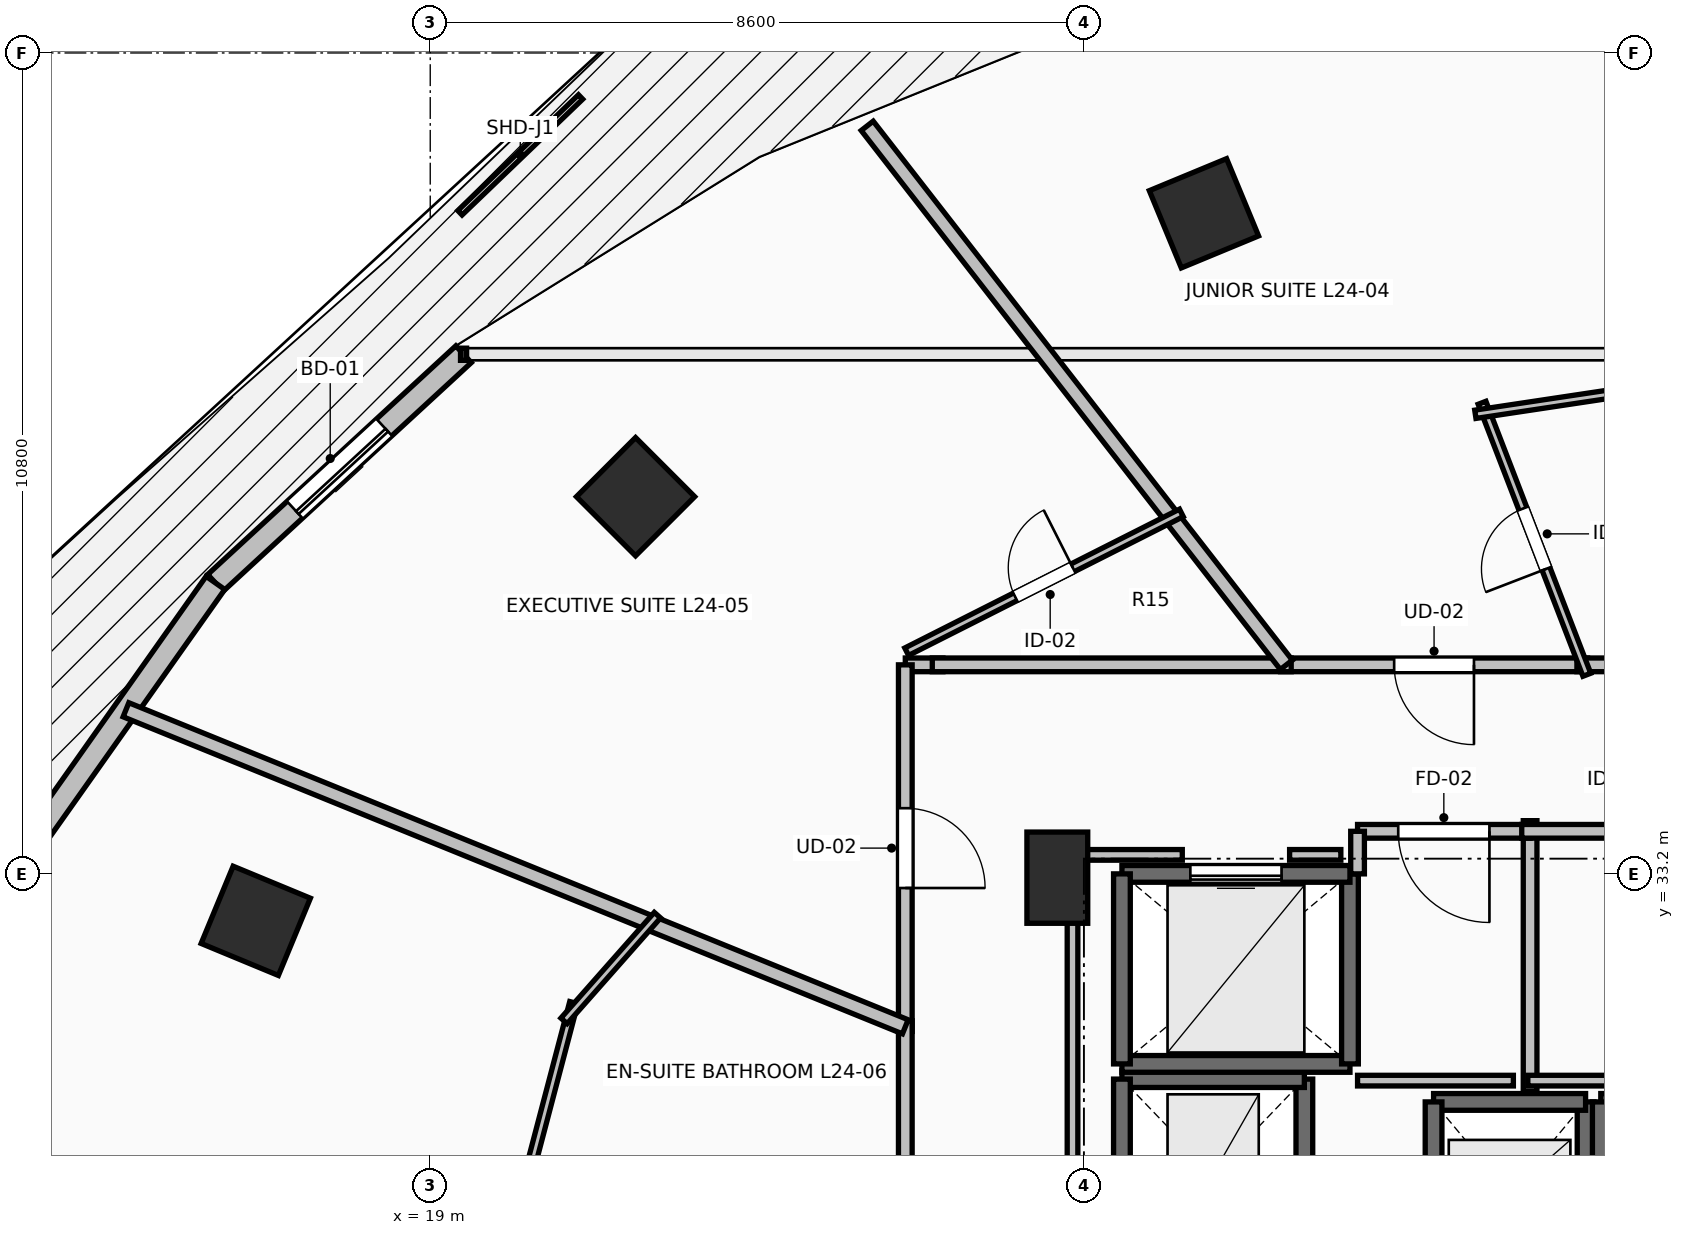
"""IFC4 building model, lengths in metres.
Left out: names, types, materials, properties, quantities, classifications, styles, units other than length and angle.
Written with IfcOpenShell. Run it as: python <this file> out.ifc"""

import sys

from ifc_helpers import new_model, si_unit, direction, frame, frame_2d, origin, origin_2d, place, context, subcontext, project, spatial, rectangle, extrude, element, fill, save


model = new_model("IFC4")
c1 = context("Model", 3, precision=1e-05, world=origin(), true_north=direction((0.0, 1.0)))
c2 = subcontext(c1, "Body", "Model", "MODEL_VIEW")
j1 = project(units=[si_unit("LENGTHUNIT", "METRE"), si_unit("PLANEANGLEUNIT", "RADIAN")], contexts=[c1])
p1 = place(None, origin())
s1 = spatial("IfcSite", under=j1, at=p1, CompositionType="ELEMENT")
p2 = place(p1, origin())
s2 = spatial("IfcBuilding", under=s1, at=p2, CompositionType="ELEMENT")
p3 = place(p2, frame((0.0, 0.0, 92.8)))
s3 = spatial("IfcBuildingStorey", under=s2, at=p3, CompositionType="ELEMENT", Elevation=92.8)
for number, where, z_axis, x_axis in (
    (1, (29.179, 41.891, 0.0), (0.0, 0.0, 1.0), (-0.383, 0.924, 0.0)),
    (2, (21.701, 38.162, 0.0), (0.0, 0.0, 1.0), (-0.707, 0.707, 0.0)),
    (3, (16.705, 32.582, 0.0), (0.0, 0.0, 1.0), (-0.924, 0.383, 0.0)),
):
    element("IfcColumn", number, at=place(p3, frame(where, z_axis=z_axis, x_axis=x_axis)), inside=s3, PredefinedType="COLUMN", context=c2, shape_type="SweptSolid", body=[
        extrude(rectangle(XDim=1.1, YDim=1.1, at=origin_2d()), origin(), (0.0, 0.0, 1.0), 3.5),
    ])
p4 = place(p3, frame((27.25, 33.15, 0.0), z_axis=(0.0, 0.0, 1.0), x_axis=(1.0, 0.0, 0.0)))
e4 = element("IfcColumn", 4, at=p4, inside=s3, PredefinedType="PILASTER", context=c2, shape_type="SweptSolid", body=[
    extrude(rectangle(XDim=0.8, YDim=1.2, at=origin_2d()), origin(), (0.0, 0.0, 1.0), 3.5),
])
p5 = place(p3, frame((19.438, 40.036, 0.0), z_axis=(0.0, 0.0, 1.0), x_axis=(-0.735416718093, -0.677615119924, 0.0)))
e5 = element("IfcWall", 5, at=p5, inside=s3, PredefinedType="STANDARD", context=c2, shape_type="SweptSolid", body=[
    extrude(rectangle(XDim=4.439, YDim=0.3, at=frame_2d((2.22, 0.0))), origin(), (0.0, 0.0, 1.0), 3.24),
])
p6 = place(p5, frame((1.419, 0.0, 0.0)))
e6 = element("IfcOpeningElement", 6, at=p6, cuts=e5, PredefinedType="OPENING", context=c2, shape_type="SweptSolid", body=[
    extrude(rectangle(XDim=1.6, YDim=2.3, at=frame_2d((0.8, 1.15))), frame((0.0, 0.165, 0.0), z_axis=(0.0, -1.0, 0.0), x_axis=(1.0, 0.0, 0.0)), (0.0, 0.0, 1.0), 0.33),
])
p7 = place(p3, frame((16.174, 37.028, 0.0), z_axis=(0.0, 0.0, 1.0), x_axis=(-0.57716435238, -0.81662801222, 0.0)))
e7 = element("IfcWall", 7, at=p7, inside=s3, PredefinedType="STANDARD", context=c2, shape_type="SweptSolid", body=[
    extrude(rectangle(XDim=4.202, YDim=0.3, at=frame_2d((2.101, 0.0))), origin(), (0.0, 0.0, 1.0), 3.24),
])
p8 = place(p3, frame((34.2, 27.8, 0.0), z_axis=(0.0, 0.0, 1.0), x_axis=(0.0, 1.0, 0.0)))
e8 = element("IfcWall", 8, at=p8, inside=s3, PredefinedType="SOLIDWALL", context=c2, shape_type="SweptSolid", body=[
    extrude(rectangle(XDim=2.4, YDim=0.22, at=frame_2d((1.2, 0.0))), origin(), (0.0, 0.0, 1.0), 3.24),
])
p9 = place(p3, frame((34.2, 30.2, 0.0), z_axis=(0.0, 0.0, 1.0), x_axis=(-1.0, 0.0, 0.0)))
e9 = element("IfcWall", 9, at=p9, inside=s3, PredefinedType="SOLIDWALL", context=c2, shape_type="SweptSolid", body=[
    extrude(rectangle(XDim=2.0, YDim=0.22, at=frame_2d((1.0, 0.0))), origin(), (0.0, 0.0, 1.0), 3.24),
])
p10 = place(p3, frame((32.2, 30.2, 0.0), z_axis=(0.0, 0.0, 1.0), x_axis=(0.0, -1.0, 0.0)))
e10 = element("IfcWall", 10, at=p10, inside=s3, PredefinedType="SOLIDWALL", context=c2, shape_type="SweptSolid", body=[
    extrude(rectangle(XDim=2.4, YDim=0.22, at=frame_2d((1.2, 0.0))), origin(), (0.0, 0.0, 1.0), 3.24),
])
p11 = place(p3, frame((36.4, 30.2, 0.0), z_axis=(0.0, 0.0, 1.0), x_axis=(-1.0, 0.0, 0.0)))
e11 = element("IfcWall", 11, at=p11, inside=s3, PredefinedType="SOLIDWALL", context=c2, shape_type="SweptSolid", body=[
    extrude(rectangle(XDim=2.0, YDim=0.22, at=frame_2d((1.0, 0.0))), origin(), (0.0, 0.0, 1.0), 3.24),
])
p12 = place(p3, frame((34.4, 30.2, 0.0), z_axis=(0.0, 0.0, 1.0), x_axis=(0.0, -1.0, 0.0)))
e12 = element("IfcWall", 12, at=p12, inside=s3, PredefinedType="SOLIDWALL", context=c2, shape_type="SweptSolid", body=[
    extrude(rectangle(XDim=2.4, YDim=0.22, at=frame_2d((1.2, 0.0))), origin(), (0.0, 0.0, 1.0), 3.24),
])
p13 = place(p3, frame((30.5, 28.0, 0.0), z_axis=(0.0, 0.0, 1.0), x_axis=(0.0, 1.0, 0.0)))
e13 = element("IfcWall", 13, at=p13, inside=s3, PredefinedType="SHEAR", context=c2, shape_type="SweptSolid", body=[
    extrude(rectangle(XDim=2.5, YDim=0.22, at=frame_2d((1.25, 0.0))), origin(), (0.0, 0.0, 1.0), 3.24),
])
p14 = place(p3, frame((30.5, 30.5, 0.0), z_axis=(0.0, 0.0, 1.0), x_axis=(-1.0, 0.0, 0.0)))
e14 = element("IfcWall", 14, at=p14, inside=s3, PredefinedType="SHEAR", context=c2, shape_type="SweptSolid", body=[
    extrude(rectangle(XDim=2.4, YDim=0.22, at=frame_2d((1.2, 0.0))), origin(), (0.0, 0.0, 1.0), 3.24),
])
p15 = place(p3, frame((28.1, 30.5, 0.0), z_axis=(0.0, 0.0, 1.0), x_axis=(0.0, -1.0, 0.0)))
e15 = element("IfcWall", 15, at=p15, inside=s3, PredefinedType="SHEAR", context=c2, shape_type="SweptSolid", body=[
    extrude(rectangle(XDim=2.5, YDim=0.22, at=frame_2d((1.25, 0.0))), origin(), (0.0, 0.0, 1.0), 3.24),
])
p16 = place(p3, frame((28.1, 30.7, 0.0), z_axis=(0.0, 0.0, 1.0), x_axis=(1.0, 0.0, 0.0)))
e16 = element("IfcWall", 16, at=p16, inside=s3, PredefinedType="SOLIDWALL", context=c2, shape_type="SweptSolid", body=[
    extrude(rectangle(XDim=3.0, YDim=0.22, at=frame_2d((1.5, 0.0))), origin(), (0.0, 0.0, 1.0), 3.24),
])
p17 = place(p3, frame((31.1, 30.7, 0.0), z_axis=(0.0, 0.0, 1.0), x_axis=(0.0, 1.0, 0.0)))
e17 = element("IfcWall", 17, at=p17, inside=s3, PredefinedType="SOLIDWALL", context=c2, shape_type="SweptSolid", body=[
    extrude(rectangle(XDim=2.5, YDim=0.22, at=frame_2d((1.25, 0.0))), origin(), (0.0, 0.0, 1.0), 3.24),
])
p18 = place(p3, frame((31.1, 33.2, 0.0), z_axis=(0.0, 0.0, 1.0), x_axis=(-1.0, 0.0, 0.0)))
e18 = element("IfcWall", 18, at=p18, inside=s3, PredefinedType="SOLIDWALL", context=c2, shape_type="SweptSolid", body=[
    extrude(rectangle(XDim=3.0, YDim=0.22, at=frame_2d((1.5, 0.0))), origin(), (0.0, 0.0, 1.0), 3.24),
])
p19 = place(p18, frame((0.9, 0.0, 0.0)))
e19 = element("IfcOpeningElement", 19, at=p19, cuts=e18, PredefinedType="OPENING", context=c2, shape_type="SweptSolid", body=[
    extrude(rectangle(XDim=1.2, YDim=2.2, at=frame_2d((0.6, 1.1))), frame((0.0, 0.125, 0.0), z_axis=(0.0, -1.0, 0.0), x_axis=(1.0, 0.0, 0.0)), (0.0, 0.0, 1.0), 0.25),
])
p20 = place(p3, frame((28.1, 33.2, 0.0), z_axis=(0.0, 0.0, 1.0), x_axis=(0.0, -1.0, 0.0)))
e20 = element("IfcWall", 20, at=p20, inside=s3, PredefinedType="SOLIDWALL", context=c2, shape_type="SweptSolid", body=[
    extrude(rectangle(XDim=2.5, YDim=0.22, at=frame_2d((1.25, 0.0))), origin(), (0.0, 0.0, 1.0), 3.24),
])
p21 = place(p3, frame((33.47, 30.34, 0.0), z_axis=(0.0, 0.0, 1.0), x_axis=(0.0, 1.0, 0.0)))
e21 = element("IfcWall", 21, at=p21, inside=s3, PredefinedType="PARTITIONING", context=c2, shape_type="SweptSolid", body=[
    extrude(rectangle(XDim=3.56, YDim=0.18, at=frame_2d((1.78, 0.0))), origin(), (0.0, 0.0, 1.0), 3.24),
])
p22 = place(p3, frame((33.47, 33.76, 0.0), z_axis=(0.0, 0.0, 1.0), x_axis=(-1.0, 0.0, 0.0)))
e22 = element("IfcWall", 22, at=p22, inside=s3, PredefinedType="PARTITIONING", context=c2, shape_type="SweptSolid", body=[
    extrude(rectangle(XDim=2.27, YDim=0.18, at=frame_2d((1.135, 0.0))), origin(), (0.0, 0.0, 1.0), 3.24),
])
p23 = place(p22, frame((0.535, 0.0, 0.0)))
e23 = element("IfcOpeningElement", 23, at=p23, cuts=e22, PredefinedType="OPENING", context=c2, shape_type="SweptSolid", body=[
    extrude(rectangle(XDim=1.2, YDim=2.15, at=frame_2d((0.6, 1.075))), frame((0.0, 0.105, 0.0), z_axis=(0.0, -1.0, 0.0), x_axis=(1.0, 0.0, 0.0)), (0.0, 0.0, 1.0), 0.21),
])
p24 = place(p3, frame((31.2, 33.76, 0.0), z_axis=(0.0, 0.0, 1.0), x_axis=(0.0, -1.0, 0.0)))
e24 = element("IfcWall", 24, at=p24, inside=s3, PredefinedType="PARTITIONING", context=c2, shape_type="SweptSolid", body=[
    extrude(rectangle(XDim=0.56, YDim=0.18, at=frame_2d((0.28, 0.0))), origin(), (0.0, 0.0, 1.0), 3.24),
])
p25 = place(p3, frame((37.49, 33.76, 0.0), z_axis=(0.0, 0.0, 1.0), x_axis=(-1.0, 0.0, 0.0)))
e25 = element("IfcWall", 25, at=p25, inside=s3, PredefinedType="PARTITIONING", context=c2, shape_type="SweptSolid", body=[
    extrude(rectangle(XDim=4.13, YDim=0.18, at=frame_2d((2.065, 0.0))), origin(), (0.0, 0.0, 1.0), 3.24),
])
p26 = place(p25, frame((1.64, 0.0, 0.0)))
e26 = element("IfcOpeningElement", 26, at=p26, cuts=e25, PredefinedType="OPENING", context=c2, shape_type="SweptSolid", body=[
    extrude(rectangle(XDim=0.85, YDim=2.1, at=frame_2d((0.425, 1.05))), frame((0.0, 0.105, 0.0), z_axis=(0.0, -1.0, 0.0), x_axis=(1.0, 0.0, 0.0)), (0.0, 0.0, 1.0), 0.21),
])
p27 = place(p3, frame((34.226, 35.95, 0.0), z_axis=(0.0, 0.0, 1.0), x_axis=(-1.0, 0.0, 0.0)))
e27 = element("IfcWall", 27, at=p27, inside=s3, PredefinedType="PARTITIONING", context=c2, shape_type="SweptSolid", body=[
    extrude(rectangle(XDim=4.039, YDim=0.18, at=frame_2d((2.02, 0.0))), origin(), (0.0, 0.0, 1.0), 2.432),
])
p28 = place(p27, frame((1.494, 0.0, 0.0)))
e28 = element("IfcOpeningElement", 28, at=p28, cuts=e27, PredefinedType="OPENING", context=c2, shape_type="SweptSolid", body=[
    extrude(rectangle(XDim=1.05, YDim=2.2, at=frame_2d((0.525, 1.1))), frame((0.0, 0.105, 0.0), z_axis=(0.0, -1.0, 0.0), x_axis=(1.0, 0.0, 0.0)), (0.0, 0.0, 1.0), 0.21),
])
p29 = place(p3, frame((36.703, 35.95, 0.0), z_axis=(0.0, 0.0, 1.0), x_axis=(-1.0, 0.0, 0.0)))
e29 = element("IfcWall", 29, at=p29, inside=s3, PredefinedType="PARTITIONING", context=c2, shape_type="SweptSolid", body=[
    extrude(rectangle(XDim=2.617, YDim=0.18, at=frame_2d((1.309, 0.0))), origin(), (0.0, 0.0, 1.0), 2.972),
])
p30 = place(p3, frame((25.745, 35.95, 0.0), z_axis=(0.0, 0.0, 1.0), x_axis=(-1.0, 0.0, 0.0)))
e30 = element("IfcWall", 30, at=p30, inside=s3, PredefinedType="PARTITIONING", context=c2, shape_type="SweptSolid", body=[
    extrude(rectangle(XDim=0.495, YDim=0.18, at=frame_2d((0.248, 0.0))), origin(), (0.0, 0.0, 1.0), 3.24),
])
p31 = place(p3, frame((25.25, 35.95, 0.0), z_axis=(0.0, 0.0, 1.0), x_axis=(0.0, -1.0, 0.0)))
e31 = element("IfcWall", 31, at=p31, inside=s3, PredefinedType="PARTITIONING", context=c2, shape_type="SweptSolid", body=[
    extrude(rectangle(XDim=4.822, YDim=0.18, at=frame_2d((2.411, 0.0))), origin(), (0.0, 0.0, 1.0), 2.432),
])
p32 = place(p31, frame((1.886, 0.0, 0.0)))
e32 = element("IfcOpeningElement", 32, at=p32, cuts=e31, PredefinedType="OPENING", context=c2, shape_type="SweptSolid", body=[
    extrude(rectangle(XDim=1.05, YDim=2.2, at=frame_2d((0.525, 1.1))), frame((0.0, 0.105, 0.0), z_axis=(0.0, -1.0, 0.0), x_axis=(1.0, 0.0, 0.0)), (0.0, 0.0, 1.0), 0.21),
])
p33 = place(p3, frame((30.327, 35.95, 0.0), z_axis=(0.0, 0.0, 1.0), x_axis=(-1.0, 0.0, 0.0)))
e33 = element("IfcWall", 33, at=p33, inside=s3, PredefinedType="PARTITIONING", context=c2, shape_type="SweptSolid", body=[
    extrude(rectangle(XDim=4.722, YDim=0.18, at=frame_2d((2.361, 0.0))), origin(), (0.0, 0.0, 1.0), 2.432),
])
p34 = place(p3, frame((25.25, 31.268, 0.0), z_axis=(0.0, 0.0, 1.0), x_axis=(0.0, -1.0, 0.0)))
e34 = element("IfcWall", 34, at=p34, inside=s3, PredefinedType="PARTITIONING", context=c2, shape_type="SweptSolid", body=[
    extrude(rectangle(XDim=3.343, YDim=0.18, at=frame_2d((1.671, 0.0))), origin(), (0.0, 0.0, 1.0), 2.432),
])
p35 = place(p3, frame((34.216, 35.819, 0.0), z_axis=(0.0, 0.0, 1.0), x_axis=(-0.359516562862, 0.933138704067, 0.0)))
e35 = element("IfcWall", 35, at=p35, inside=s3, PredefinedType="PARTITIONING", context=c2, shape_type="SweptSolid", body=[
    extrude(rectangle(XDim=3.835, YDim=0.11, at=frame_2d((1.917, 0.0))), origin(), (0.0, 0.0, 1.0), 2.432),
])
p36 = place(p35, frame((1.492, 0.0, 0.0)))
e36 = element("IfcOpeningElement", 36, at=p36, cuts=e35, PredefinedType="OPENING", context=c2, shape_type="SweptSolid", body=[
    extrude(rectangle(XDim=0.85, YDim=2.1, at=frame_2d((0.425, 1.05))), frame((0.0, 0.07, 0.0), z_axis=(0.0, -1.0, 0.0), x_axis=(1.0, 0.0, 0.0)), (0.0, 0.0, 1.0), 0.14),
])
p37 = place(p3, frame((32.75, 39.246, 0.0), z_axis=(0.0, 0.0, 1.0), x_axis=(0.988874324222, 0.148753389525, 0.0)))
e37 = element("IfcWall", 37, at=p37, inside=s3, PredefinedType="PARTITIONING", context=c2, shape_type="SweptSolid", body=[
    extrude(rectangle(XDim=3.527, YDim=0.11, at=frame_2d((1.764, 0.0))), origin(), (0.0, 0.0, 1.0), 2.432),
])
p38 = place(p3, frame((24.749, 43.041, 0.0), z_axis=(0.0, 0.0, 1.0), x_axis=(0.61384652665, -0.789425387051, 0.0)))
e38 = element("IfcWall", 38, at=p38, inside=s3, PredefinedType="PARTITIONING", context=c2, shape_type="SweptSolid", body=[
    extrude(rectangle(XDim=8.983, YDim=0.2, at=frame_2d((4.491, 0.0))), origin(), (0.0, 0.0, 1.0), 2.432),
])
p39 = place(p3, frame((25.268, 36.123, 0.0), z_axis=(0.0, 0.0, 1.0), x_axis=(0.892501687321, 0.451044053425, 0.0)))
e39 = element("IfcWall", 39, at=p39, inside=s3, PredefinedType="PARTITIONING", context=c2, shape_type="SweptSolid", body=[
    extrude(rectangle(XDim=4.049, YDim=0.11, at=frame_2d((2.025, 0.0))), origin(), (0.0, 0.0, 1.0), 2.432),
])
p40 = place(p39, frame((1.6, 0.0, 0.0)))
e40 = element("IfcOpeningElement", 40, at=p40, cuts=e39, PredefinedType="OPENING", context=c2, shape_type="SweptSolid", body=[
    extrude(rectangle(XDim=0.85, YDim=2.1, at=frame_2d((0.425, 1.05))), frame((0.0, 0.07, 0.0), z_axis=(0.0, -1.0, 0.0), x_axis=(1.0, 0.0, 0.0)), (0.0, 0.0, 1.0), 0.14),
])
p41 = place(p3, frame((14.997, 35.359, 0.0), z_axis=(0.0, 0.0, 1.0), x_axis=(0.926288615834, -0.376814808861, 0.0)))
e41 = element("IfcWall", 41, at=p41, inside=s3, PredefinedType="PARTITIONING", context=c2, shape_type="SweptSolid", body=[
    extrude(rectangle(XDim=11.069, YDim=0.2, at=frame_2d((5.534, 0.0))), origin(), (0.0, 0.0, 1.0), 2.677),
])
p42 = place(p3, frame((20.141, 28.667, 0.0), z_axis=(0.0, 0.0, 1.0), x_axis=(0.254489206931, 0.967075614187, 0.0)))
e42 = element("IfcWall", 42, at=p42, inside=s3, PredefinedType="PARTITIONING", context=c2, shape_type="SweptSolid", body=[
    extrude(rectangle(XDim=2.937, YDim=0.11, at=frame_2d((1.468, 0.0))), origin(), (0.0, 0.0, 1.0), 2.432),
])
p43 = place(p3, frame((20.76, 31.266, 0.0), z_axis=(0.0, 0.0, 1.0), x_axis=(0.662008805554, 0.749496058275, 0.0)))
e43 = element("IfcWall", 43, at=p43, inside=s3, PredefinedType="PARTITIONING", context=c2, shape_type="SweptSolid", body=[
    extrude(rectangle(XDim=1.856, YDim=0.11, at=frame_2d((0.928, 0.0))), origin(), (0.0, 0.0, 1.0), 2.922),
])
p44 = place(p3, frame((31.2, 30.48, 0.0), z_axis=(0.0, 0.0, 1.0), x_axis=(1.0, 0.0, 0.0)))
e44 = element("IfcWall", 44, at=p44, inside=s3, PredefinedType="PARTITIONING", context=c2, shape_type="SweptSolid", body=[
    extrude(rectangle(XDim=2.05, YDim=0.14, at=frame_2d((1.025, 0.0))), origin(), (0.0, 0.0, 1.0), 3.24),
])
p45 = place(p3, frame((33.44, 30.48, 0.0), z_axis=(0.0, 0.0, 1.0), x_axis=(1.0, 0.0, 0.0)))
e45 = element("IfcWall", 45, at=p45, inside=s3, PredefinedType="PARTITIONING", context=c2, shape_type="SweptSolid", body=[
    extrude(rectangle(XDim=3.225, YDim=0.14, at=frame_2d((1.613, 0.0))), origin(), (0.0, 0.0, 1.0), 2.432),
])
p46 = place(p3, frame((27.45, 28.196, 0.0), z_axis=(0.0, 0.0, 1.0), x_axis=(0.0, 1.0, 0.0)))
e46 = element("IfcWall", 46, at=p46, inside=s3, PredefinedType="PARTITIONING", context=c2, shape_type="SweptSolid", body=[
    extrude(rectangle(XDim=5.254, YDim=0.14, at=frame_2d((2.627, 0.0))), origin(), (0.0, 0.0, 1.0), 2.432),
])
p47 = place(p3, frame((27.45, 33.45, 0.0), z_axis=(0.0, 0.0, 1.0), x_axis=(1.0, 0.0, 0.0)))
e47 = element("IfcWall", 47, at=p47, inside=s3, PredefinedType="PARTITIONING", context=c2, shape_type="SweptSolid", body=[
    extrude(rectangle(XDim=1.444, YDim=0.14, at=frame_2d((0.722, 0.0))), origin(), (0.0, 0.0, 1.0), 2.432),
])
p48 = place(p3, frame((30.306, 33.45, 0.0), z_axis=(0.0, 0.0, 1.0), x_axis=(1.0, 0.0, 0.0)))
e48 = element("IfcWall", 48, at=p48, inside=s3, PredefinedType="PARTITIONING", context=c2, shape_type="SweptSolid", body=[
    extrude(rectangle(XDim=0.674, YDim=0.14, at=frame_2d((0.337, 0.0))), origin(), (0.0, 0.0, 1.0), 3.24),
])
p49 = place(p6, origin())
e49 = element("IfcDoor", 49, at=p49, inside=s3, OperationType="SLIDING_TO_LEFT", PredefinedType="DOOR", context=c2, shape_type="SweptSolid", body=[
    extrude(rectangle(XDim=1.6, YDim=2.3, at=frame_2d((0.8, 1.15))), frame((0.0, 0.025, 0.0), z_axis=(0.0, -1.0, 0.0), x_axis=(1.0, 0.0, 0.0)), (0.0, 0.0, 1.0), 0.05),
])
fill(e6, e49)
p50 = place(p19, origin())
e50 = element("IfcDoor", 50, at=p50, inside=s3, OperationType="SLIDING_TO_LEFT", PredefinedType="DOOR", context=c2, shape_type="SweptSolid", body=[
    extrude(rectangle(XDim=1.2, YDim=2.2, at=frame_2d((0.6, 1.1))), frame((0.0, 0.025, 0.0), z_axis=(0.0, -1.0, 0.0), x_axis=(1.0, 0.0, 0.0)), (0.0, 0.0, 1.0), 0.05),
])
fill(e19, e50)
p51 = place(p23, origin())
e51 = element("IfcDoor", 51, at=p51, inside=s3, OperationType="SINGLE_SWING_LEFT", PredefinedType="DOOR", context=c2, shape_type="SweptSolid", body=[
    extrude(rectangle(XDim=1.2, YDim=2.15, at=frame_2d((0.6, 1.075))), frame((0.0, 0.025, 0.0), z_axis=(0.0, -1.0, 0.0), x_axis=(1.0, 0.0, 0.0)), (0.0, 0.0, 1.0), 0.05),
])
fill(e23, e51)
p52 = place(p28, origin())
e52 = element("IfcDoor", 52, at=p52, inside=s3, OperationType="SINGLE_SWING_LEFT", PredefinedType="DOOR", context=c2, shape_type="SweptSolid", body=[
    extrude(rectangle(XDim=1.05, YDim=2.2, at=frame_2d((0.525, 1.1))), frame((0.0, 0.025, 0.0), z_axis=(0.0, -1.0, 0.0), x_axis=(1.0, 0.0, 0.0)), (0.0, 0.0, 1.0), 0.05),
])
fill(e28, e52)
p53 = place(p32, origin())
e53 = element("IfcDoor", 53, at=p53, inside=s3, OperationType="SINGLE_SWING_RIGHT", PredefinedType="DOOR", context=c2, shape_type="SweptSolid", body=[
    extrude(rectangle(XDim=1.05, YDim=2.2, at=frame_2d((0.525, 1.1))), frame((0.0, 0.025, 0.0), z_axis=(0.0, -1.0, 0.0), x_axis=(1.0, 0.0, 0.0)), (0.0, 0.0, 1.0), 0.05),
])
fill(e32, e53)
p54 = place(p36, origin())
e54 = element("IfcDoor", 54, at=p54, inside=s3, OperationType="SINGLE_SWING_LEFT", PredefinedType="DOOR", context=c2, shape_type="SweptSolid", body=[
    extrude(rectangle(XDim=0.85, YDim=2.1, at=frame_2d((0.425, 1.05))), frame((0.0, 0.025, 0.0), z_axis=(0.0, -1.0, 0.0), x_axis=(1.0, 0.0, 0.0)), (0.0, 0.0, 1.0), 0.05),
])
fill(e36, e54)
p55 = place(p40, origin())
e55 = element("IfcDoor", 55, at=p55, inside=s3, OperationType="SINGLE_SWING_RIGHT", PredefinedType="DOOR", context=c2, shape_type="SweptSolid", body=[
    extrude(rectangle(XDim=0.85, YDim=2.1, at=frame_2d((0.425, 1.05))), frame((0.0, 0.025, 0.0), z_axis=(0.0, -1.0, 0.0), x_axis=(1.0, 0.0, 0.0)), (0.0, 0.0, 1.0), 0.05),
])
fill(e40, e55)
save(model, sys.argv[1])
